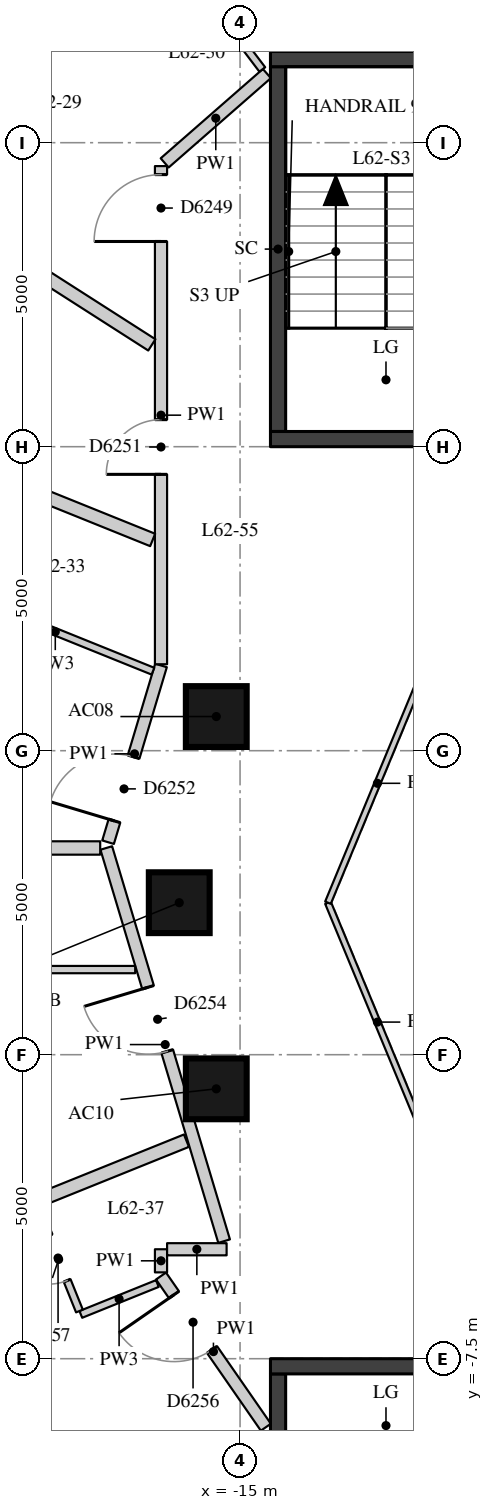
"""IFC4 building model, lengths in metres.
Left out: names, types, materials, properties, quantities, classifications, styles, units other than length and angle.
Written with IfcOpenShell. Run it as: python <this file> out.ifc"""

import sys

from ifc_helpers import new_model, si_unit, direction, frame, frame_2d, origin, origin_2d, place, context, subcontext, project, spatial, rectangle, extrude, element, fill, save


model = new_model("IFC4")
c1 = context("Model", 3, precision=1e-05, world=origin(), true_north=direction((0.0, 1.0)))
c2 = subcontext(c1, "Body", "Model", "MODEL_VIEW")
j1 = project(units=[si_unit("LENGTHUNIT", "METRE"), si_unit("PLANEANGLEUNIT", "RADIAN")], contexts=[c1])
p1 = place(None, origin())
s1 = spatial("IfcSite", under=j1, at=p1, CompositionType="ELEMENT")
p2 = place(p1, origin())
s2 = spatial("IfcBuilding", under=s1, at=p2, CompositionType="ELEMENT")
p3 = place(p2, frame((0.0, 0.0, 218.9)))
s3 = spatial("IfcBuildingStorey", under=s2, at=p3, CompositionType="ELEMENT", Elevation=218.9)
for number, where, z_axis, x_axis in (
    (1, (-15.391, 3.062, 0.0), (0.0, 0.0, 1.0), (1.0, 0.0, 0.0)),
    (2, (-16.0, 0.0, 0.0), (0.0, 0.0, 1.0), (1.0, 0.0, 0.0)),
    (3, (-15.391, -3.062, 0.0), (0.0, 0.0, 1.0), (1.0, 0.0, 0.0)),
):
    element("IfcColumn", number, at=place(p3, frame(where, z_axis=z_axis, x_axis=x_axis)), inside=s3, PredefinedType="COLUMN", context=c2, shape_type="SweptSolid", body=[
        extrude(rectangle(XDim=1.0, YDim=1.0, at=origin_2d()), origin(), (0.0, 0.0, 1.0), 3.3),
    ])
p4 = place(p3, frame((-14.375, 7.75, -0.28), z_axis=(0.0, 0.0, 1.0), x_axis=(0.0, 1.0, 0.0)))
e4 = element("IfcWall", 4, at=p4, inside=s3, PredefinedType="SHEAR", context=c2, shape_type="SweptSolid", body=[
    extrude(rectangle(XDim=6.0, YDim=0.25, at=frame_2d((3.0, 0.0))), origin(), (0.0, 0.0, 1.0), 3.3),
])
for number, where, z_axis, x_axis in (
    (5, (-14.5, 13.875, -0.28), (0.0, 0.0, 1.0), (1.0, 0.0, 0.0)),
    (6, (-14.5, 7.625, -0.28), (0.0, 0.0, 1.0), (1.0, 0.0, 0.0)),
):
    element("IfcWall", number, at=place(p3, frame(where, z_axis=z_axis, x_axis=x_axis)), inside=s3, PredefinedType="SHEAR", context=c2, shape_type="SweptSolid", body=[
        extrude(rectangle(XDim=5.2, YDim=0.25, at=frame_2d((2.6, 0.0))), origin(), (0.0, 0.0, 1.0), 3.3),
    ])
p5 = place(p3, frame((-14.375, -13.75, -0.28), z_axis=(0.0, 0.0, 1.0), x_axis=(0.0, 1.0, 0.0)))
e7 = element("IfcWall", 7, at=p5, inside=s3, PredefinedType="SHEAR", context=c2, shape_type="SweptSolid", body=[
    extrude(rectangle(XDim=6.0, YDim=0.25, at=frame_2d((3.0, 0.0))), origin(), (0.0, 0.0, 1.0), 3.3),
])
p6 = place(p3, frame((-14.5, -7.625, -0.28), z_axis=(0.0, 0.0, 1.0), x_axis=(1.0, 0.0, 0.0)))
e8 = element("IfcWall", 8, at=p6, inside=s3, PredefinedType="SHEAR", context=c2, shape_type="SweptSolid", body=[
    extrude(rectangle(XDim=5.2, YDim=0.25, at=frame_2d((2.6, 0.0))), origin(), (0.0, 0.0, 1.0), 3.3),
])
p7 = place(p3, frame((-14.575, -8.627, 0.0), z_axis=(0.0, 0.0, 1.0), x_axis=(-0.569910381143, 0.821706856163, 0.0)))
e9 = element("IfcWall", 9, at=p7, inside=s3, PredefinedType="PARTITIONING", context=c2, shape_type="SweptSolid", body=[
    extrude(rectangle(XDim=3.026, YDim=0.2, at=frame_2d((1.513, 0.0))), origin(), (0.0, 0.0, 1.0), 3.02),
])
p8 = place(p7, frame((1.552, 0.0, 0.0)))
e10 = element("IfcOpeningElement", 10, at=p8, cuts=e9, PredefinedType="OPENING", context=c2, shape_type="SweptSolid", body=[
    extrude(rectangle(XDim=1.1, YDim=2.1, at=frame_2d((0.55, 1.05))), frame((0.0, 0.11, 0.0), z_axis=(0.0, -1.0, 0.0), x_axis=(1.0, 0.0, 0.0)), (0.0, 0.0, 1.0), 0.22),
])
p9 = place(p3, frame((-16.3, -6.08, 0.0), z_axis=(0.0, 0.0, 1.0), x_axis=(0.0, 1.0, 0.0)))
e11 = element("IfcWall", 11, at=p9, inside=s3, PredefinedType="PARTITIONING", context=c2, shape_type="SweptSolid", body=[
    extrude(rectangle(XDim=0.38, YDim=0.2, at=frame_2d((0.19, 0.0))), origin(), (0.0, 0.0, 1.0), 3.02),
])
p10 = place(p3, frame((-16.2, -5.7, 0.0), z_axis=(0.0, 0.0, 1.0), x_axis=(1.0, 0.0, 0.0)))
e12 = element("IfcWall", 12, at=p10, inside=s3, PredefinedType="PARTITIONING", context=c2, shape_type="SweptSolid", body=[
    extrude(rectangle(XDim=0.979, YDim=0.2, at=frame_2d((0.489, 0.0))), origin(), (0.0, 0.0, 1.0), 3.02),
])
p11 = place(p3, frame((-15.262, -5.567, 0.0), z_axis=(0.0, 0.0, 1.0), x_axis=(-0.28704593875, 0.957916817395, 0.0)))
e13 = element("IfcWall", 13, at=p11, inside=s3, PredefinedType="PARTITIONING", context=c2, shape_type="SweptSolid", body=[
    extrude(rectangle(XDim=6.751, YDim=0.2, at=frame_2d((3.375, 0.0))), origin(), (0.0, 0.0, 1.0), 3.02),
])
p12 = place(p11, frame((3.259, 0.0, 0.0)))
e14 = element("IfcOpeningElement", 14, at=p12, cuts=e13, PredefinedType="OPENING", context=c2, shape_type="SweptSolid", body=[
    extrude(rectangle(XDim=1.1, YDim=2.1, at=frame_2d((0.55, 1.05))), frame((0.0, 0.11, 0.0), z_axis=(0.0, -1.0, 0.0), x_axis=(1.0, 0.0, 0.0)), (0.0, 0.0, 1.0), 0.22),
])
p13 = place(p3, frame((-17.171, 0.995, 0.0), z_axis=(0.0, 0.0, 1.0), x_axis=(0.286919722033, 0.957954629984, 0.0)))
e15 = element("IfcWall", 15, at=p13, inside=s3, PredefinedType="PARTITIONING", context=c2, shape_type="SweptSolid", body=[
    extrude(rectangle(XDim=3.034, YDim=0.2, at=frame_2d((1.517, 0.0))), origin(), (0.0, 0.0, 1.0), 3.02),
])
p14 = place(p13, frame((0.365, 0.0, 0.0)))
e16 = element("IfcOpeningElement", 16, at=p14, cuts=e15, PredefinedType="OPENING", context=c2, shape_type="SweptSolid", body=[
    extrude(rectangle(XDim=1.1, YDim=2.1, at=frame_2d((0.55, 1.05))), frame((0.0, 0.11, 0.0), z_axis=(0.0, -1.0, 0.0), x_axis=(1.0, 0.0, 0.0)), (0.0, 0.0, 1.0), 0.22),
])
p15 = place(p3, frame((-16.3, 3.922, 0.0), z_axis=(0.0, 0.0, 1.0), x_axis=(0.0, 1.0, 0.0)))
e17 = element("IfcWall", 17, at=p15, inside=s3, PredefinedType="PARTITIONING", context=c2, shape_type="SweptSolid", body=[
    extrude(rectangle(XDim=8.193, YDim=0.2, at=frame_2d((4.097, 0.0))), origin(), (0.0, 0.0, 1.0), 3.02),
])
p16 = place(p15, frame((6.953, 0.0, 0.0)))
e18 = element("IfcOpeningElement", 18, at=p16, cuts=e17, PredefinedType="OPENING", context=c2, shape_type="SweptSolid", body=[
    extrude(rectangle(XDim=1.1, YDim=2.1, at=frame_2d((0.55, 1.05))), frame((0.0, 0.11, 0.0), z_axis=(0.0, -1.0, 0.0), x_axis=(1.0, 0.0, 0.0)), (0.0, 0.0, 1.0), 0.22),
])
p17 = place(p15, frame((3.123, 0.0, 0.0)))
e19 = element("IfcOpeningElement", 19, at=p17, cuts=e17, PredefinedType="OPENING", context=c2, shape_type="SweptSolid", body=[
    extrude(rectangle(XDim=0.9, YDim=2.1, at=frame_2d((0.45, 1.05))), frame((0.0, 0.11, 0.0), z_axis=(0.0, -1.0, 0.0), x_axis=(1.0, 0.0, 0.0)), (0.0, 0.0, 1.0), 0.22),
])
p18 = place(p3, frame((-16.24, 12.168, 0.0), z_axis=(0.0, 0.0, 1.0), x_axis=(0.752820521129, 0.658225844956, 0.0)))
e20 = element("IfcWall", 20, at=p18, inside=s3, PredefinedType="PARTITIONING", context=c2, shape_type="SweptSolid", body=[
    extrude(rectangle(XDim=2.232, YDim=0.2, at=frame_2d((1.116, 0.0))), origin(), (0.0, 0.0, 1.0), 3.02),
])
p19 = place(p3, frame((-21.055, 12.121, 0.0), z_axis=(0.0, 0.0, 1.0), x_axis=(0.842286811608, -0.539029616061, 0.0)))
e21 = element("IfcWall", 21, at=p19, inside=s3, PredefinedType="PARTITIONING", context=c2, shape_type="SweptSolid", body=[
    extrude(rectangle(XDim=5.466, YDim=0.22, at=frame_2d((2.733, 0.0))), origin(), (0.0, 0.0, 1.0), 3.02),
])
p20 = place(p3, frame((-22.896, 8.571, 0.0), z_axis=(0.0, 0.0, 1.0), x_axis=(0.927387137769, -0.374103056256, 0.0)))
e22 = element("IfcWall", 22, at=p20, inside=s3, PredefinedType="PARTITIONING", context=c2, shape_type="SweptSolid", body=[
    extrude(rectangle(XDim=6.964, YDim=0.22, at=frame_2d((3.482, 0.0))), origin(), (0.0, 0.0, 1.0), 3.02),
])
p21 = place(p3, frame((-24.4, 0.9, 0.0), z_axis=(0.0, 0.0, 1.0), x_axis=(1.0, 0.0, 0.0)))
e23 = element("IfcWall", 23, at=p21, inside=s3, PredefinedType="PARTITIONING", context=c2, shape_type="SweptSolid", body=[
    extrude(rectangle(XDim=7.1, YDim=0.22, at=frame_2d((3.55, 0.0))), origin(), (0.0, 0.0, 1.0), 2.47),
])
p22 = place(p3, frame((-21.651, -6.241, 0.0), z_axis=(0.0, 0.0, 1.0), x_axis=(0.927390089179, 0.37409573974, 0.0)))
e24 = element("IfcWall", 24, at=p22, inside=s3, PredefinedType="PARTITIONING", context=c2, shape_type="SweptSolid", body=[
    extrude(rectangle(XDim=6.221, YDim=0.22, at=frame_2d((3.11, 0.0))), origin(), (0.0, 0.0, 1.0), 3.02),
])
p23 = place(p3, frame((-14.634, 13.704, 0.0), z_axis=(0.0, 0.0, 1.0), x_axis=(-0.603613230526, 0.797277284221, 0.0)))
e25 = element("IfcWall", 25, at=p23, inside=s3, PredefinedType="PARTITIONING", context=c2, shape_type="SweptSolid", body=[
    extrude(rectangle(XDim=2.115, YDim=0.12, at=frame_2d((1.058, 0.0))), origin(), (0.0, 0.0, 1.0), 3.02),
])
p24 = place(p3, frame((-16.433, 3.808, 0.0), z_axis=(0.0, 0.0, 1.0), x_axis=(-0.927374031513, 0.374135544522, 0.0)))
e26 = element("IfcWall", 26, at=p24, inside=s3, PredefinedType="PARTITIONING", context=c2, shape_type="SweptSolid", body=[
    extrude(rectangle(XDim=3.464, YDim=0.12, at=frame_2d((1.732, 0.0))), origin(), (0.0, 0.0, 1.0), 3.02),
])
p25 = place(p3, frame((-16.725, -1.1, 0.0), z_axis=(0.0, 0.0, 1.0), x_axis=(-1.0, 0.0, 0.0)))
e27 = element("IfcWall", 27, at=p25, inside=s3, PredefinedType="PARTITIONING", context=c2, shape_type="SweptSolid", body=[
    extrude(rectangle(XDim=3.275, YDim=0.12, at=frame_2d((1.638, 0.0))), origin(), (0.0, 0.0, 1.0), 2.47),
])
p26 = place(p3, frame((-16.36, -6.264, 0.0), z_axis=(0.0, 0.0, 1.0), x_axis=(-0.927381089245, -0.374118049967, 0.0)))
e28 = element("IfcWall", 28, at=p26, inside=s3, PredefinedType="PARTITIONING", context=c2, shape_type="SweptSolid", body=[
    extrude(rectangle(XDim=1.357, YDim=0.12, at=frame_2d((0.679, 0.0))), origin(), (0.0, 0.0, 1.0), 3.02),
])
p27 = place(p3, frame((-17.641, -6.716, 0.0), z_axis=(0.0, 0.0, 1.0), x_axis=(-0.374103450988, 0.927386978536, 0.0)))
e29 = element("IfcWall", 29, at=p27, inside=s3, PredefinedType="PARTITIONING", context=c2, shape_type="SweptSolid", body=[
    extrude(rectangle(XDim=1.83, YDim=0.12, at=frame_2d((0.915, 0.0))), origin(), (0.0, 0.0, 1.0), 3.02),
])
p28 = place(p27, frame((0.54, 0.0, 0.0)))
e30 = element("IfcOpeningElement", 30, at=p28, cuts=e29, PredefinedType="OPENING", context=c2, shape_type="SweptSolid", body=[
    extrude(rectangle(XDim=0.8, YDim=2.1, at=frame_2d((0.4, 1.05))), frame((0.0, 0.07, 0.0), z_axis=(0.0, -1.0, 0.0), x_axis=(1.0, 0.0, 0.0)), (0.0, 0.0, 1.0), 0.14),
])
for number, where, z_axis, x_axis in (
    (31, (-11.927, -3.927, 0.0), (0.0, 0.0, 1.0), (-0.383, 0.924, 0.0)),
    (32, (-13.554, 0.0, 0.0), (0.0, 0.0, 1.0), (0.383, 0.924, 0.0)),
):
    element("IfcWall", number, at=place(p3, frame(where, z_axis=z_axis, x_axis=x_axis)), inside=s3, PredefinedType="PARTITIONING", context=c2, shape_type="SweptSolid", body=[
        extrude(rectangle(XDim=4.251, YDim=0.1, at=frame_2d((2.125, 0.0))), origin(), (0.0, 0.0, 1.0), 3.02),
    ])
p29 = place(p16, origin())
e33 = element("IfcDoor", 33, at=p29, inside=s3, OperationType="SINGLE_SWING_LEFT", PredefinedType="DOOR", context=c2, shape_type="SweptSolid", body=[
    extrude(rectangle(XDim=1.1, YDim=2.1, at=frame_2d((0.55, 1.05))), frame((0.0, 0.025, 0.0), z_axis=(0.0, -1.0, 0.0), x_axis=(1.0, 0.0, 0.0)), (0.0, 0.0, 1.0), 0.05),
])
fill(e18, e33)
p30 = place(p17, origin())
e34 = element("IfcDoor", 34, at=p30, inside=s3, OperationType="SINGLE_SWING_LEFT", PredefinedType="DOOR", context=c2, shape_type="SweptSolid", body=[
    extrude(rectangle(XDim=0.9, YDim=2.1, at=frame_2d((0.45, 1.05))), frame((0.0, 0.025, 0.0), z_axis=(0.0, -1.0, 0.0), x_axis=(1.0, 0.0, 0.0)), (0.0, 0.0, 1.0), 0.05),
])
fill(e19, e34)
p31 = place(p14, origin())
e35 = element("IfcDoor", 35, at=p31, inside=s3, OperationType="SINGLE_SWING_LEFT", PredefinedType="DOOR", context=c2, shape_type="SweptSolid", body=[
    extrude(rectangle(XDim=1.1, YDim=2.1, at=frame_2d((0.55, 1.05))), frame((0.0, 0.025, 0.0), z_axis=(0.0, -1.0, 0.0), x_axis=(1.0, 0.0, 0.0)), (0.0, 0.0, 1.0), 0.05),
])
fill(e16, e35)
p32 = place(p12, origin())
e36 = element("IfcDoor", 36, at=p32, inside=s3, OperationType="SINGLE_SWING_RIGHT", PredefinedType="DOOR", context=c2, shape_type="SweptSolid", body=[
    extrude(rectangle(XDim=1.1, YDim=2.1, at=frame_2d((0.55, 1.05))), frame((0.0, 0.025, 0.0), z_axis=(0.0, -1.0, 0.0), x_axis=(1.0, 0.0, 0.0)), (0.0, 0.0, 1.0), 0.05),
])
fill(e14, e36)
p33 = place(p8, origin())
e37 = element("IfcDoor", 37, at=p33, inside=s3, OperationType="SINGLE_SWING_RIGHT", PredefinedType="DOOR", context=c2, shape_type="SweptSolid", body=[
    extrude(rectangle(XDim=1.1, YDim=2.1, at=frame_2d((0.55, 1.05))), frame((0.0, 0.025, 0.0), z_axis=(0.0, -1.0, 0.0), x_axis=(1.0, 0.0, 0.0)), (0.0, 0.0, 1.0), 0.05),
])
fill(e10, e37)
p34 = place(p28, origin())
e38 = element("IfcDoor", 38, at=p34, inside=s3, OperationType="SINGLE_SWING_RIGHT", PredefinedType="DOOR", context=c2, shape_type="SweptSolid", body=[
    extrude(rectangle(XDim=0.8, YDim=2.1, at=frame_2d((0.4, 1.05))), frame((0.0, 0.025, 0.0), z_axis=(0.0, -1.0, 0.0), x_axis=(1.0, 0.0, 0.0)), (0.0, 0.0, 1.0), 0.05),
])
fill(e30, e38)
save(model, sys.argv[1])
